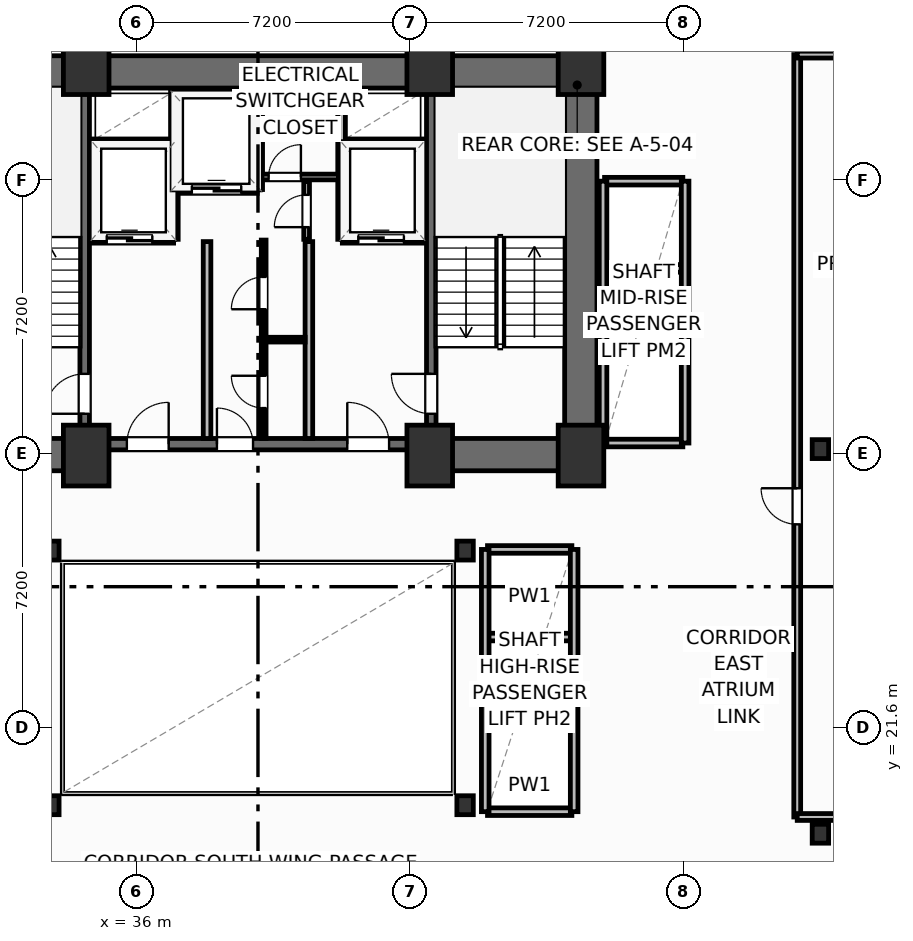
"""IFC4 building model, lengths in metres.
Left out: names, types, materials, properties, quantities, classifications, styles, units other than length and angle.
Written with IfcOpenShell. Run it as: python <this file> out.ifc"""

import sys

from ifc_helpers import new_model, si_unit, direction, frame, frame_2d, origin, origin_2d, place, context, subcontext, project, spatial, rectangle, i_section, extrude, element, fill, save


model = new_model("IFC4")
c1 = context("Model", 3, precision=1e-05, world=origin(), true_north=direction((0.0, 1.0)))
c2 = subcontext(c1, "Body", "Model", "MODEL_VIEW")
j1 = project(units=[si_unit("LENGTHUNIT", "METRE"), si_unit("PLANEANGLEUNIT", "RADIAN")], contexts=[c1])
p1 = place(None, origin())
s1 = spatial("IfcSite", under=j1, at=p1, CompositionType="ELEMENT")
p2 = place(p1, origin())
s2 = spatial("IfcBuilding", under=s1, at=p2, CompositionType="ELEMENT")
p3 = place(p2, frame((0.0, 0.0, 27.0)))
s3 = spatial("IfcBuildingStorey", under=s2, at=p3, CompositionType="ELEMENT", Elevation=27.0)
for number, where, z_axis, x_axis in (
    (1, (34.68, 28.75, 0.0), (0.0, 0.0, 1.0), (1.0, 0.0, 0.0)),
    (2, (43.72, 28.75, 0.0), (0.0, 0.0, 1.0), (1.0, 0.0, 0.0)),
    (3, (47.7, 28.75, 0.0), (0.0, 0.0, 1.0), (1.0, 0.0, 0.0)),
    (4, (34.68, 39.05, 0.0), (0.0, 0.0, 1.0), (1.0, 0.0, 0.0)),
    (5, (43.72, 39.05, 0.0), (0.0, 0.0, 1.0), (1.0, 0.0, 0.0)),
    (6, (47.7, 39.05, 0.0), (0.0, 0.0, 1.0), (1.0, 0.0, 0.0)),
):
    element("IfcColumn", number, at=place(p3, frame(where, z_axis=z_axis, x_axis=x_axis)), inside=s3, PredefinedType="COLUMN", context=c2, shape_type="SweptSolid", body=[
        extrude(rectangle(XDim=1.2, YDim=1.6, at=origin_2d()), origin(), (0.0, 0.0, 1.0), 3.7),
    ])
for number, where, z_axis, x_axis in (
    (7, (33.75, 19.55, 0.0), (0.0, 0.0, 1.0), (1.0, 0.0, 0.0)),
    (8, (44.65, 19.55, 0.0), (0.0, 0.0, 1.0), (1.0, 0.0, 0.0)),
    (9, (33.75, 26.25, 0.0), (0.0, 0.0, 1.0), (1.0, 0.0, 0.0)),
    (10, (44.65, 26.25, 0.0), (0.0, 0.0, 1.0), (1.0, 0.0, 0.0)),
    (11, (54.0, 18.8, 0.0), (0.0, 0.0, 1.0), (1.0, 0.0, 0.0)),
    (12, (54.0, 28.92, 0.0), (0.0, 0.0, 1.0), (1.0, 0.0, 0.0)),
):
    element("IfcColumn", number, at=place(p3, frame(where, z_axis=z_axis, x_axis=x_axis)), inside=s3, PredefinedType="COLUMN", context=c2, shape_type="SweptSolid", body=[
        extrude(i_section(OverallWidth=0.432, OverallDepth=0.498, WebThickness=0.056, FlangeThickness=0.089, FilletRadius=0.025, at=origin_2d()), origin(), (0.0, 0.0, 1.0), 3.7),
    ])
p4 = place(p3, frame((30.28, 38.845, 0.0), z_axis=(0.0, 0.0, 1.0), x_axis=(1.0, 0.0, 0.0)))
e13 = element("IfcWall", 13, at=p4, inside=s3, PredefinedType="SHEAR", context=c2, shape_type="SweptSolid", body=[
    extrude(rectangle(XDim=17.84, YDim=0.85, at=frame_2d((8.92, 0.0))), origin(), (0.0, 0.0, 1.0), 3.45),
])
p5 = place(p3, frame((47.695, 29.2, 0.0), z_axis=(0.0, 0.0, 1.0), x_axis=(0.0, 1.0, 0.0)))
e14 = element("IfcWall", 14, at=p5, inside=s3, PredefinedType="SHEAR", context=c2, shape_type="SweptSolid", body=[
    extrude(rectangle(XDim=9.22, YDim=0.85, at=frame_2d((4.61, 0.0))), origin(), (0.0, 0.0, 1.0), 3.45),
])
for number, where, z_axis, x_axis in (
    (15, (30.28, 28.775, 0.0), (0.0, 0.0, 1.0), (1.0, 0.0, 0.0)),
    (16, (43.6, 28.775, 0.0), (0.0, 0.0, 1.0), (1.0, 0.0, 0.0)),
):
    element("IfcWall", number, at=place(p3, frame(where, z_axis=z_axis, x_axis=x_axis)), inside=s3, PredefinedType="SHEAR", context=c2, shape_type="SweptSolid", body=[
        extrude(rectangle(XDim=4.52, YDim=0.85, at=frame_2d((2.26, 0.0))), origin(), (0.0, 0.0, 1.0), 3.45),
    ])
p6 = place(p3, frame((34.8, 29.05, 0.0), z_axis=(0.0, 0.0, 1.0), x_axis=(1.0, 0.0, 0.0)))
e17 = element("IfcWall", 17, at=p6, inside=s3, PredefinedType="SHEAR", context=c2, shape_type="SweptSolid", body=[
    extrude(rectangle(XDim=8.8, YDim=0.3, at=frame_2d((4.4, 0.0))), origin(), (0.0, 0.0, 1.0), 3.45),
])
p7 = place(p6, frame((0.95, 0.0, 0.0)))
e18 = element("IfcOpeningElement", 18, at=p7, cuts=e17, PredefinedType="OPENING", context=c2, shape_type="SweptSolid", body=[
    extrude(rectangle(XDim=1.1, YDim=2.15, at=frame_2d((0.55, 1.075))), frame((0.0, 0.16, 0.0), z_axis=(0.0, -1.0, 0.0), x_axis=(1.0, 0.0, 0.0)), (0.0, 0.0, 1.0), 0.32),
])
p8 = place(p6, frame((6.75, 0.0, 0.0)))
e19 = element("IfcOpeningElement", 19, at=p8, cuts=e17, PredefinedType="OPENING", context=c2, shape_type="SweptSolid", body=[
    extrude(rectangle(XDim=1.1, YDim=2.15, at=frame_2d((0.55, 1.075))), frame((0.0, 0.16, 0.0), z_axis=(0.0, -1.0, 0.0), x_axis=(1.0, 0.0, 0.0)), (0.0, 0.0, 1.0), 0.32),
])
p9 = place(p6, frame((3.32, 0.0, 0.0)))
e20 = element("IfcOpeningElement", 20, at=p9, cuts=e17, PredefinedType="OPENING", context=c2, shape_type="SweptSolid", body=[
    extrude(rectangle(XDim=0.95, YDim=2.15, at=frame_2d((0.475, 1.075))), frame((0.0, 0.16, 0.0), z_axis=(0.0, -1.0, 0.0), x_axis=(1.0, 0.0, 0.0)), (0.0, 0.0, 1.0), 0.32),
])
p10 = place(p3, frame((34.64, 29.2, 0.0), z_axis=(0.0, 0.0, 1.0), x_axis=(0.0, 1.0, 0.0)))
e21 = element("IfcWall", 21, at=p10, inside=s3, PredefinedType="SHEAR", context=c2, shape_type="SweptSolid", body=[
    extrude(rectangle(XDim=9.22, YDim=0.25, at=frame_2d((4.61, 0.0))), origin(), (0.0, 0.0, 1.0), 3.45),
])
p11 = place(p10, frame((0.65, 0.0, 0.0)))
e22 = element("IfcOpeningElement", 22, at=p11, cuts=e21, PredefinedType="OPENING", context=c2, shape_type="SweptSolid", body=[
    extrude(rectangle(XDim=1.05, YDim=2.15, at=frame_2d((0.525, 1.075))), frame((0.0, 0.135, 0.0), z_axis=(0.0, -1.0, 0.0), x_axis=(1.0, 0.0, 0.0)), (0.0, 0.0, 1.0), 0.27),
])
p12 = place(p3, frame((43.76, 29.2, 0.0), z_axis=(0.0, 0.0, 1.0), x_axis=(0.0, 1.0, 0.0)))
e23 = element("IfcWall", 23, at=p12, inside=s3, PredefinedType="SHEAR", context=c2, shape_type="SweptSolid", body=[
    extrude(rectangle(XDim=9.22, YDim=0.25, at=frame_2d((4.61, 0.0))), origin(), (0.0, 0.0, 1.0), 3.45),
])
p13 = place(p12, frame((0.65, 0.0, 0.0)))
e24 = element("IfcOpeningElement", 24, at=p13, cuts=e23, PredefinedType="OPENING", context=c2, shape_type="SweptSolid", body=[
    extrude(rectangle(XDim=1.05, YDim=2.15, at=frame_2d((0.525, 1.075))), frame((0.0, 0.135, 0.0), z_axis=(0.0, -1.0, 0.0), x_axis=(1.0, 0.0, 0.0)), (0.0, 0.0, 1.0), 0.27),
])
p14 = place(p3, frame((53.39, 19.24, 0.0), z_axis=(0.0, 0.0, 1.0), x_axis=(0.0, 1.0, 0.0)))
e25 = element("IfcWall", 25, at=p14, inside=s3, PredefinedType="PARTITIONING", context=c2, shape_type="SweptSolid", body=[
    extrude(rectangle(XDim=20.06, YDim=0.18, at=frame_2d((10.03, 0.0))), origin(), (0.0, 0.0, 1.0), 3.45),
])
p15 = place(p14, frame((7.7, 0.0, 0.0)))
e26 = element("IfcOpeningElement", 26, at=p15, cuts=e25, PredefinedType="OPENING", context=c2, shape_type="SweptSolid", body=[
    extrude(rectangle(XDim=0.95, YDim=2.05, at=frame_2d((0.475, 1.025))), frame((0.0, 0.1, 0.0), z_axis=(0.0, -1.0, 0.0), x_axis=(1.0, 0.0, 0.0)), (0.0, 0.0, 1.0), 0.2),
])
p16 = place(p3, frame((53.39, 19.24, 0.0), z_axis=(0.0, 0.0, 1.0), x_axis=(1.0, 0.0, 0.0)))
e27 = element("IfcWall", 27, at=p16, inside=s3, PredefinedType="PARTITIONING", context=c2, shape_type="SweptSolid", body=[
    extrude(rectangle(XDim=23.61, YDim=0.18, at=frame_2d((11.805, 0.0))), origin(), (0.0, 0.0, 1.0), 3.45),
])
p17 = place(p3, frame((53.39, 39.3, 0.0), z_axis=(0.0, 0.0, 1.0), x_axis=(1.0, 0.0, 0.0)))
e28 = element("IfcWall", 28, at=p17, inside=s3, PredefinedType="PARTITIONING", context=c2, shape_type="SweptSolid", body=[
    extrude(rectangle(XDim=6.136, YDim=0.18, at=frame_2d((3.068, 0.0))), origin(), (0.0, 0.0, 1.0), 3.45),
])
for number, where, z_axis, x_axis in (
    (29, (37.86, 29.2, 0.0), (0.0, 0.0, 1.0), (0.0, 1.0, 0.0)),
    (30, (40.54, 29.2, 0.0), (0.0, 0.0, 1.0), (0.0, 1.0, 0.0)),
):
    element("IfcWall", number, at=place(p3, frame(where, z_axis=z_axis, x_axis=x_axis)), inside=s3, PredefinedType="PARTITIONING", context=c2, shape_type="SweptSolid", body=[
        extrude(rectangle(XDim=5.18, YDim=0.2, at=frame_2d((2.59, 0.0))), origin(), (0.0, 0.0, 1.0), 3.45),
    ])
p18 = place(p3, frame((34.8, 34.44, 0.0), z_axis=(0.0, 0.0, 1.0), x_axis=(1.0, 0.0, 0.0)))
e31 = element("IfcWall", 31, at=p18, inside=s3, PredefinedType="PARTITIONING", context=c2, shape_type="SweptSolid", body=[
    extrude(rectangle(XDim=2.18, YDim=0.2, at=frame_2d((1.09, 0.0))), origin(), (0.0, 0.0, 1.0), 3.45),
])
p19 = place(p18, frame((0.42, 0.0, 0.0)))
e32 = element("IfcOpeningElement", 32, at=p19, cuts=e31, PredefinedType="OPENING", context=c2, shape_type="SweptSolid", body=[
    extrude(rectangle(XDim=1.2, YDim=2.2, at=frame_2d((0.6, 1.1))), frame((0.0, 0.11, 0.0), z_axis=(0.0, -1.0, 0.0), x_axis=(1.0, 0.0, 0.0)), (0.0, 0.0, 1.0), 0.22),
])
p20 = place(p3, frame((34.8, 36.98, 0.0), z_axis=(0.0, 0.0, 1.0), x_axis=(1.0, 0.0, 0.0)))
e33 = element("IfcWall", 33, at=p20, inside=s3, PredefinedType="PARTITIONING", context=c2, shape_type="SweptSolid", body=[
    extrude(rectangle(XDim=2.18, YDim=0.2, at=frame_2d((1.09, 0.0))), origin(), (0.0, 0.0, 1.0), 3.45),
])
p21 = place(p3, frame((37.0, 34.44, 0.0), z_axis=(0.0, 0.0, 1.0), x_axis=(0.0, 1.0, 0.0)))
e34 = element("IfcWall", 34, at=p21, inside=s3, PredefinedType="PARTITIONING", context=c2, shape_type="SweptSolid", body=[
    extrude(rectangle(XDim=3.9, YDim=0.2, at=frame_2d((1.95, 0.0))), origin(), (0.0, 0.0, 1.0), 3.45),
])
p22 = place(p3, frame((41.42, 34.44, 0.0), z_axis=(0.0, 0.0, 1.0), x_axis=(1.0, 0.0, 0.0)))
e35 = element("IfcWall", 35, at=p22, inside=s3, PredefinedType="PARTITIONING", context=c2, shape_type="SweptSolid", body=[
    extrude(rectangle(XDim=2.18, YDim=0.2, at=frame_2d((1.09, 0.0))), origin(), (0.0, 0.0, 1.0), 3.45),
])
p23 = place(p22, frame((0.42, 0.0, 0.0)))
e36 = element("IfcOpeningElement", 36, at=p23, cuts=e35, PredefinedType="OPENING", context=c2, shape_type="SweptSolid", body=[
    extrude(rectangle(XDim=1.2, YDim=2.2, at=frame_2d((0.6, 1.1))), frame((0.0, 0.11, 0.0), z_axis=(0.0, -1.0, 0.0), x_axis=(1.0, 0.0, 0.0)), (0.0, 0.0, 1.0), 0.22),
])
p24 = place(p3, frame((41.42, 36.98, 0.0), z_axis=(0.0, 0.0, 1.0), x_axis=(1.0, 0.0, 0.0)))
e37 = element("IfcWall", 37, at=p24, inside=s3, PredefinedType="PARTITIONING", context=c2, shape_type="SweptSolid", body=[
    extrude(rectangle(XDim=2.18, YDim=0.2, at=frame_2d((1.09, 0.0))), origin(), (0.0, 0.0, 1.0), 3.45),
])
p25 = place(p3, frame((41.4, 34.44, 0.0), z_axis=(0.0, 0.0, 1.0), x_axis=(0.0, 1.0, 0.0)))
e38 = element("IfcWall", 38, at=p25, inside=s3, PredefinedType="PARTITIONING", context=c2, shape_type="SweptSolid", body=[
    extrude(rectangle(XDim=3.9, YDim=0.2, at=frame_2d((1.95, 0.0))), origin(), (0.0, 0.0, 1.0), 3.45),
])
p26 = place(p3, frame((37.06, 35.75, 0.0), z_axis=(0.0, 0.0, 1.0), x_axis=(1.0, 0.0, 0.0)))
e39 = element("IfcWall", 39, at=p26, inside=s3, PredefinedType="PARTITIONING", context=c2, shape_type="SweptSolid", body=[
    extrude(rectangle(XDim=2.12, YDim=0.2, at=frame_2d((1.06, 0.0))), origin(), (0.0, 0.0, 1.0), 3.45),
])
p27 = place(p26, frame((0.4, 0.0, 0.0)))
e40 = element("IfcOpeningElement", 40, at=p27, cuts=e39, PredefinedType="OPENING", context=c2, shape_type="SweptSolid", body=[
    extrude(rectangle(XDim=1.3, YDim=2.2, at=frame_2d((0.65, 1.1))), frame((0.0, 0.11, 0.0), z_axis=(0.0, -1.0, 0.0), x_axis=(1.0, 0.0, 0.0)), (0.0, 0.0, 1.0), 0.22),
])
p28 = place(p3, frame((39.22, 35.75, 0.0), z_axis=(0.0, 0.0, 1.0), x_axis=(0.0, 1.0, 0.0)))
e41 = element("IfcWall", 41, at=p28, inside=s3, PredefinedType="PARTITIONING", context=c2, shape_type="SweptSolid", body=[
    extrude(rectangle(XDim=2.59, YDim=0.2, at=frame_2d((1.295, 0.0))), origin(), (0.0, 0.0, 1.0), 3.45),
])
p29 = place(p3, frame((39.3, 36.08, 0.0), z_axis=(0.0, 0.0, 1.0), x_axis=(1.0, 0.0, 0.0)))
e42 = element("IfcWall", 42, at=p29, inside=s3, PredefinedType="PARTITIONING", context=c2, shape_type="SweptSolid", body=[
    extrude(rectangle(XDim=2.02, YDim=0.15, at=frame_2d((1.01, 0.0))), origin(), (0.0, 0.0, 1.0), 3.45),
])
p30 = place(p29, frame((0.18, 0.0, 0.0)))
e43 = element("IfcOpeningElement", 43, at=p30, cuts=e42, PredefinedType="OPENING", context=c2, shape_type="SweptSolid", body=[
    extrude(rectangle(XDim=0.85, YDim=2.05, at=frame_2d((0.425, 1.025))), frame((0.0, 0.085, 0.0), z_axis=(0.0, -1.0, 0.0), x_axis=(1.0, 0.0, 0.0)), (0.0, 0.0, 1.0), 0.17),
])
p31 = place(p3, frame((40.48, 34.44, 0.0), z_axis=(0.0, 0.0, 1.0), x_axis=(0.0, 1.0, 0.0)))
e44 = element("IfcWall", 44, at=p31, inside=s3, PredefinedType="PARTITIONING", context=c2, shape_type="SweptSolid", body=[
    extrude(rectangle(XDim=1.52, YDim=0.15, at=frame_2d((0.76, 0.0))), origin(), (0.0, 0.0, 1.0), 3.45),
])
p32 = place(p31, frame((0.32, 0.0, 0.0)))
e45 = element("IfcOpeningElement", 45, at=p32, cuts=e44, PredefinedType="OPENING", context=c2, shape_type="SweptSolid", body=[
    extrude(rectangle(XDim=0.85, YDim=2.05, at=frame_2d((0.425, 1.025))), frame((0.0, 0.085, 0.0), z_axis=(0.0, -1.0, 0.0), x_axis=(1.0, 0.0, 0.0)), (0.0, 0.0, 1.0), 0.17),
])
p33 = place(p3, frame((39.35, 31.8, 0.0), z_axis=(0.0, 0.0, 1.0), x_axis=(1.0, 0.0, 0.0)))
e46 = element("IfcWall", 46, at=p33, inside=s3, PredefinedType="PARTITIONING", context=c2, shape_type="SweptSolid", body=[
    extrude(rectangle(XDim=1.09, YDim=0.125, at=frame_2d((0.545, 0.0))), origin(), (0.0, 0.0, 1.0), 3.45),
])
p34 = place(p3, frame((39.35, 29.2, 0.0), z_axis=(0.0, 0.0, 1.0), x_axis=(0.0, 1.0, 0.0)))
e47 = element("IfcWall", 47, at=p34, inside=s3, PredefinedType="PARTITIONING", context=c2, shape_type="SweptSolid", body=[
    extrude(rectangle(XDim=5.22, YDim=0.125, at=frame_2d((2.61, 0.0))), origin(), (0.0, 0.0, 1.0), 3.45),
])
p35 = place(p34, frame((0.8, 0.0, 0.0)))
e48 = element("IfcOpeningElement", 48, at=p35, cuts=e47, PredefinedType="OPENING", context=c2, shape_type="SweptSolid", body=[
    extrude(rectangle(XDim=0.85, YDim=2.05, at=frame_2d((0.425, 1.025))), frame((0.0, 0.073, 0.0), z_axis=(0.0, -1.0, 0.0), x_axis=(1.0, 0.0, 0.0)), (0.0, 0.0, 1.0), 0.145),
])
p36 = place(p34, frame((3.4, 0.0, 0.0)))
e49 = element("IfcOpeningElement", 49, at=p36, cuts=e47, PredefinedType="OPENING", context=c2, shape_type="SweptSolid", body=[
    extrude(rectangle(XDim=0.85, YDim=2.05, at=frame_2d((0.425, 1.025))), frame((0.0, 0.073, 0.0), z_axis=(0.0, -1.0, 0.0), x_axis=(1.0, 0.0, 0.0)), (0.0, 0.0, 1.0), 0.145),
])
for number, where, z_axis, x_axis in (
    (50, (48.32, 31.375, 0.0), (0.0, 0.0, 1.0), (1.0, 0.0, 0.0)),
    (51, (48.32, 33.675, 0.0), (0.0, 0.0, 1.0), (1.0, 0.0, 0.0)),
):
    element("IfcWall", number, at=place(p3, frame(where, z_axis=z_axis, x_axis=x_axis)), inside=s3, PredefinedType="PARTITIONING", context=c2, shape_type="SweptSolid", body=[
        extrude(rectangle(XDim=2.06, YDim=0.2, at=frame_2d((1.03, 0.0))), origin(), (0.0, 0.0, 1.0), 3.45),
    ])
p37 = place(p3, frame((48.32, 29.08, 0.0), z_axis=(0.0, 0.0, 1.0), x_axis=(1.0, 0.0, 0.0)))
e52 = element("IfcWall", 52, at=p37, inside=s3, PredefinedType="PARTITIONING", context=c2, shape_type="SweptSolid", body=[
    extrude(rectangle(XDim=2.06, YDim=0.2, at=frame_2d((1.03, 0.0))), origin(), (0.0, 0.0, 1.0), 2.662),
])
p38 = place(p3, frame((48.32, 35.97, 0.0), z_axis=(0.0, 0.0, 1.0), x_axis=(1.0, 0.0, 0.0)))
e53 = element("IfcWall", 53, at=p38, inside=s3, PredefinedType="PARTITIONING", context=c2, shape_type="SweptSolid", body=[
    extrude(rectangle(XDim=2.06, YDim=0.2, at=frame_2d((1.03, 0.0))), origin(), (0.0, 0.0, 1.0), 3.45),
])
for number, where, z_axis, x_axis in (
    (54, (48.28, 29.08, 0.0), (0.0, 0.0, 1.0), (0.0, 1.0, 0.0)),
    (55, (50.44, 29.08, 0.0), (0.0, 0.0, 1.0), (0.0, 1.0, 0.0)),
):
    element("IfcWall", number, at=place(p3, frame(where, z_axis=z_axis, x_axis=x_axis)), inside=s3, PredefinedType="PARTITIONING", context=c2, shape_type="SweptSolid", body=[
        extrude(rectangle(XDim=6.89, YDim=0.2, at=frame_2d((3.445, 0.0))), origin(), (0.0, 0.0, 1.0), 3.45),
    ])
for number, where, z_axis, x_axis in (
    (56, (45.24, 21.675, 0.0), (0.0, 0.0, 1.0), (1.0, 0.0, 0.0)),
    (57, (45.24, 23.975, 0.0), (0.0, 0.0, 1.0), (1.0, 0.0, 0.0)),
):
    element("IfcWall", number, at=place(p3, frame(where, z_axis=z_axis, x_axis=x_axis)), inside=s3, PredefinedType="PARTITIONING", context=c2, shape_type="SweptSolid", body=[
        extrude(rectangle(XDim=2.22, YDim=0.2, at=frame_2d((1.11, 0.0))), origin(), (0.0, 0.0, 1.0), 3.45),
    ])
p39 = place(p3, frame((45.24, 19.38, 0.0), z_axis=(0.0, 0.0, 1.0), x_axis=(1.0, 0.0, 0.0)))
e58 = element("IfcWall", 58, at=p39, inside=s3, PredefinedType="PARTITIONING", context=c2, shape_type="SweptSolid", body=[
    extrude(rectangle(XDim=2.22, YDim=0.2, at=frame_2d((1.11, 0.0))), origin(), (0.0, 0.0, 1.0), 2.662),
])
p40 = place(p3, frame((45.24, 26.28, 0.0), z_axis=(0.0, 0.0, 1.0), x_axis=(1.0, 0.0, 0.0)))
e59 = element("IfcWall", 59, at=p40, inside=s3, PredefinedType="PARTITIONING", context=c2, shape_type="SweptSolid", body=[
    extrude(rectangle(XDim=2.22, YDim=0.2, at=frame_2d((1.11, 0.0))), origin(), (0.0, 0.0, 1.0), 3.45),
])
for number, where, z_axis, x_axis in (
    (60, (45.18, 19.38, 0.0), (0.0, 0.0, 1.0), (0.0, 1.0, 0.0)),
    (61, (47.52, 19.38, 0.0), (0.0, 0.0, 1.0), (0.0, 1.0, 0.0)),
):
    element("IfcWall", number, at=place(p3, frame(where, z_axis=z_axis, x_axis=x_axis)), inside=s3, PredefinedType="PARTITIONING", context=c2, shape_type="SweptSolid", body=[
        extrude(rectangle(XDim=6.9, YDim=0.2, at=frame_2d((3.45, 0.0))), origin(), (0.0, 0.0, 1.0), 3.45),
    ])
p41 = place(p15, origin())
e62 = element("IfcDoor", 62, at=p41, inside=s3, OperationType="SINGLE_SWING_RIGHT", PredefinedType="DOOR", context=c2, shape_type="SweptSolid", body=[
    extrude(rectangle(XDim=0.95, YDim=2.05, at=frame_2d((0.475, 1.025))), frame((0.0, 0.025, 0.0), z_axis=(0.0, -1.0, 0.0), x_axis=(1.0, 0.0, 0.0)), (0.0, 0.0, 1.0), 0.05),
])
fill(e26, e62)
p42 = place(p11, origin())
e63 = element("IfcDoor", 63, at=p42, inside=s3, OperationType="SINGLE_SWING_LEFT", PredefinedType="DOOR", context=c2, shape_type="SweptSolid", body=[
    extrude(rectangle(XDim=1.05, YDim=2.15, at=frame_2d((0.525, 1.075))), frame((0.0, 0.025, 0.0), z_axis=(0.0, -1.0, 0.0), x_axis=(1.0, 0.0, 0.0)), (0.0, 0.0, 1.0), 0.05),
])
fill(e22, e63)
p43 = place(p13, origin())
e64 = element("IfcDoor", 64, at=p43, inside=s3, OperationType="SINGLE_SWING_RIGHT", PredefinedType="DOOR", context=c2, shape_type="SweptSolid", body=[
    extrude(rectangle(XDim=1.05, YDim=2.15, at=frame_2d((0.525, 1.075))), frame((0.0, 0.025, 0.0), z_axis=(0.0, -1.0, 0.0), x_axis=(1.0, 0.0, 0.0)), (0.0, 0.0, 1.0), 0.05),
])
fill(e24, e64)
p44 = place(p7, origin())
e65 = element("IfcDoor", 65, at=p44, inside=s3, OperationType="SINGLE_SWING_RIGHT", PredefinedType="DOOR", context=c2, shape_type="SweptSolid", body=[
    extrude(rectangle(XDim=1.1, YDim=2.15, at=frame_2d((0.55, 1.075))), frame((0.0, 0.025, 0.0), z_axis=(0.0, -1.0, 0.0), x_axis=(1.0, 0.0, 0.0)), (0.0, 0.0, 1.0), 0.05),
])
fill(e18, e65)
p45 = place(p8, origin())
e66 = element("IfcDoor", 66, at=p45, inside=s3, OperationType="SINGLE_SWING_LEFT", PredefinedType="DOOR", context=c2, shape_type="SweptSolid", body=[
    extrude(rectangle(XDim=1.1, YDim=2.15, at=frame_2d((0.55, 1.075))), frame((0.0, 0.025, 0.0), z_axis=(0.0, -1.0, 0.0), x_axis=(1.0, 0.0, 0.0)), (0.0, 0.0, 1.0), 0.05),
])
fill(e19, e66)
p46 = place(p19, origin())
e67 = element("IfcDoor", 67, at=p46, inside=s3, OperationType="SLIDING_TO_LEFT", PredefinedType="DOOR", context=c2, shape_type="SweptSolid", body=[
    extrude(rectangle(XDim=1.2, YDim=2.2, at=frame_2d((0.6, 1.1))), frame((0.0, 0.025, 0.0), z_axis=(0.0, -1.0, 0.0), x_axis=(1.0, 0.0, 0.0)), (0.0, 0.0, 1.0), 0.05),
])
fill(e32, e67)
p47 = place(p23, origin())
e68 = element("IfcDoor", 68, at=p47, inside=s3, OperationType="SLIDING_TO_LEFT", PredefinedType="DOOR", context=c2, shape_type="SweptSolid", body=[
    extrude(rectangle(XDim=1.2, YDim=2.2, at=frame_2d((0.6, 1.1))), frame((0.0, 0.025, 0.0), z_axis=(0.0, -1.0, 0.0), x_axis=(1.0, 0.0, 0.0)), (0.0, 0.0, 1.0), 0.05),
])
fill(e36, e68)
p48 = place(p27, origin())
e69 = element("IfcDoor", 69, at=p48, inside=s3, OperationType="SLIDING_TO_LEFT", PredefinedType="DOOR", context=c2, shape_type="SweptSolid", body=[
    extrude(rectangle(XDim=1.3, YDim=2.2, at=frame_2d((0.65, 1.1))), frame((0.0, 0.025, 0.0), z_axis=(0.0, -1.0, 0.0), x_axis=(1.0, 0.0, 0.0)), (0.0, 0.0, 1.0), 0.05),
])
fill(e40, e69)
p49 = place(p30, origin())
e70 = element("IfcDoor", 70, at=p49, inside=s3, OperationType="SINGLE_SWING_RIGHT", PredefinedType="DOOR", context=c2, shape_type="SweptSolid", body=[
    extrude(rectangle(XDim=0.85, YDim=2.05, at=frame_2d((0.425, 1.025))), frame((0.0, 0.025, 0.0), z_axis=(0.0, -1.0, 0.0), x_axis=(1.0, 0.0, 0.0)), (0.0, 0.0, 1.0), 0.05),
])
fill(e43, e70)
p50 = place(p32, origin())
e71 = element("IfcDoor", 71, at=p50, inside=s3, OperationType="SINGLE_SWING_LEFT", PredefinedType="DOOR", context=c2, shape_type="SweptSolid", body=[
    extrude(rectangle(XDim=0.85, YDim=2.05, at=frame_2d((0.425, 1.025))), frame((0.0, 0.025, 0.0), z_axis=(0.0, -1.0, 0.0), x_axis=(1.0, 0.0, 0.0)), (0.0, 0.0, 1.0), 0.05),
])
fill(e45, e71)
p51 = place(p35, origin())
e72 = element("IfcDoor", 72, at=p51, inside=s3, OperationType="SINGLE_SWING_RIGHT", PredefinedType="DOOR", context=c2, shape_type="SweptSolid", body=[
    extrude(rectangle(XDim=0.85, YDim=2.05, at=frame_2d((0.425, 1.025))), frame((0.0, 0.025, 0.0), z_axis=(0.0, -1.0, 0.0), x_axis=(1.0, 0.0, 0.0)), (0.0, 0.0, 1.0), 0.05),
])
fill(e48, e72)
p52 = place(p36, origin())
e73 = element("IfcDoor", 73, at=p52, inside=s3, OperationType="SINGLE_SWING_LEFT", PredefinedType="DOOR", context=c2, shape_type="SweptSolid", body=[
    extrude(rectangle(XDim=0.85, YDim=2.05, at=frame_2d((0.425, 1.025))), frame((0.0, 0.025, 0.0), z_axis=(0.0, -1.0, 0.0), x_axis=(1.0, 0.0, 0.0)), (0.0, 0.0, 1.0), 0.05),
])
fill(e49, e73)
p53 = place(p9, origin())
e74 = element("IfcDoor", 74, at=p53, inside=s3, OperationType="SINGLE_SWING_LEFT", PredefinedType="DOOR", context=c2, shape_type="SweptSolid", body=[
    extrude(rectangle(XDim=0.95, YDim=2.15, at=frame_2d((0.475, 1.075))), frame((0.0, 0.025, 0.0), z_axis=(0.0, -1.0, 0.0), x_axis=(1.0, 0.0, 0.0)), (0.0, 0.0, 1.0), 0.05),
])
fill(e20, e74)
save(model, sys.argv[1])
